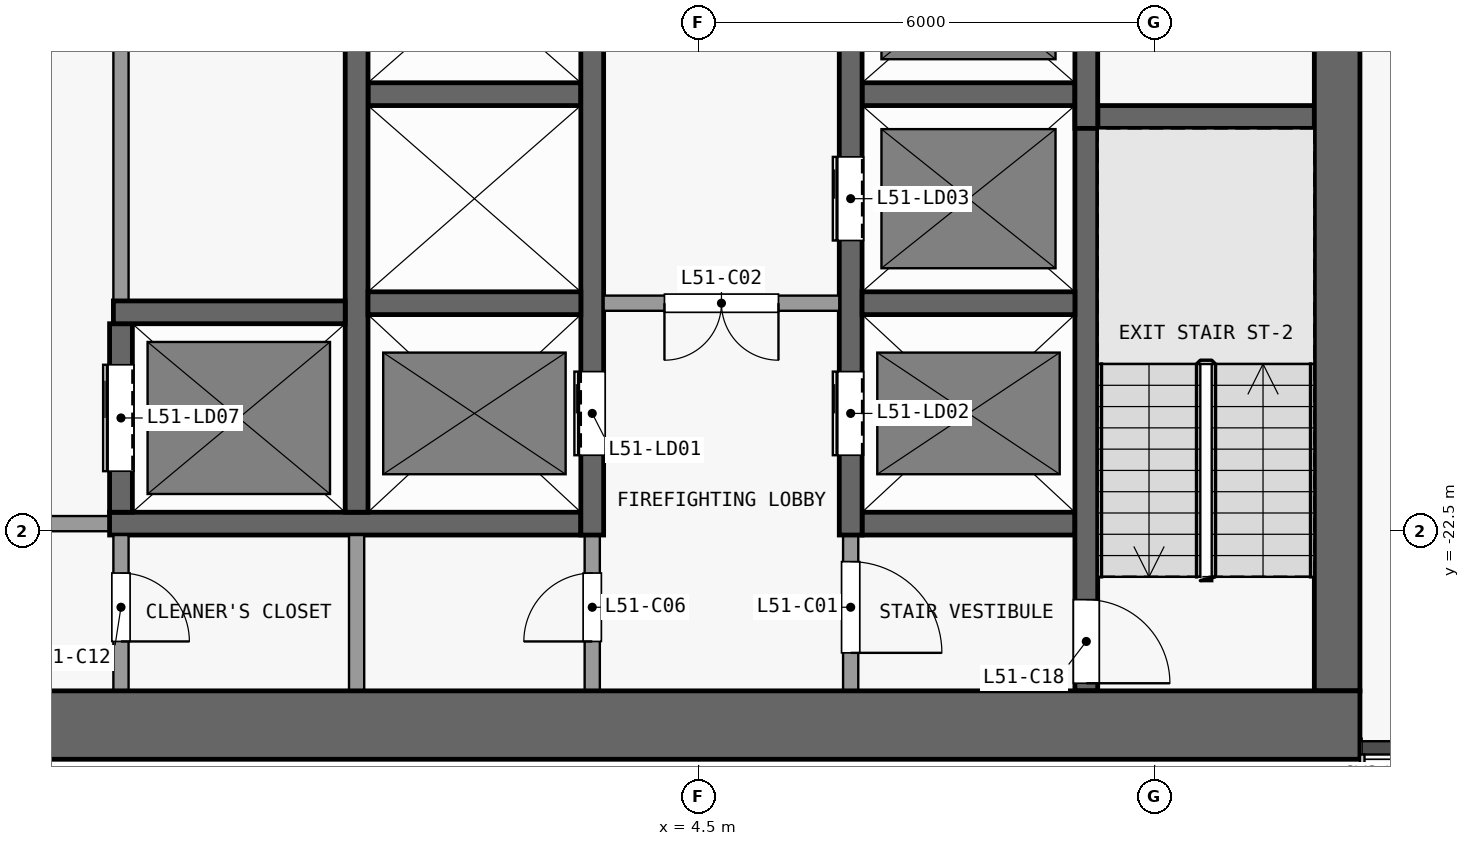
"""IFC4 building model, lengths in metres.
Left out: names, types, materials, properties, quantities, classifications, styles, units other than length and angle.
Written with IfcOpenShell. Run it as: python <this file> out.ifc"""

import sys

from ifc_helpers import new_model, si_unit, direction, frame, frame_2d, origin, place, context, subcontext, project, spatial, rectangle, extrude, element, fill, save


model = new_model("IFC4")
c1 = context("Model", 3, precision=1e-05, world=origin(), true_north=direction((0.0, 1.0)))
c2 = subcontext(c1, "Body", "Model", "MODEL_VIEW")
j1 = project(units=[si_unit("LENGTHUNIT", "METRE"), si_unit("PLANEANGLEUNIT", "RADIAN")], contexts=[c1])
p1 = place(None, origin())
s1 = spatial("IfcSite", under=j1, at=p1, CompositionType="ELEMENT")
p2 = place(p1, origin())
s2 = spatial("IfcBuilding", under=s1, at=p2, CompositionType="ELEMENT")
p3 = place(p2, frame((0.0, 0.0, 205.1)))
s3 = spatial("IfcBuildingStorey", under=s2, at=p3, CompositionType="ELEMENT", Elevation=205.1)
p4 = place(p3, frame((-13.2, -25.05, 0.0), z_axis=(0.0, 0.0, 1.0), x_axis=(1.0, 0.0, 0.0)))
e1 = element("IfcWall", 1, at=p4, inside=s3, PredefinedType="SHEAR", context=c2, shape_type="SweptSolid", body=[
    extrude(rectangle(XDim=26.4, YDim=0.9, at=frame_2d((13.2, 0.0))), origin(), (0.0, 0.0, 1.0), 3.3),
])
p5 = place(p3, frame((12.9, -24.6, 0.0), z_axis=(0.0, 0.0, 1.0), x_axis=(0.0, 1.0, 0.0)))
e2 = element("IfcWall", 2, at=p5, inside=s3, PredefinedType="SHEAR", context=c2, shape_type="SweptSolid", body=[
    extrude(rectangle(XDim=16.1, YDim=0.6, at=frame_2d((8.05, 0.0))), origin(), (0.0, 0.0, 1.0), 3.3),
])
p6 = place(p3, frame((-3.25, -22.4, 0.0), z_axis=(0.0, 0.0, 1.0), x_axis=(-1.0, 0.0, 0.0)))
e3 = element("IfcWall", 3, at=p6, inside=s3, PredefinedType="PARTITIONING", context=c2, shape_type="SweptSolid", body=[
    extrude(rectangle(XDim=6.2, YDim=0.2, at=frame_2d((3.1, 0.0))), origin(), (0.0, 0.0, 1.0), 3.3),
])
p7 = place(p6, frame((0.8, 0.0, 0.0)))
e4 = element("IfcOpeningElement", 4, at=p7, cuts=e3, PredefinedType="OPENING", context=c2, shape_type="SweptSolid", body=[
    extrude(rectangle(XDim=1.5, YDim=2.1, at=frame_2d((0.75, 1.05))), frame((0.0, 0.11, 0.0), z_axis=(0.0, -1.0, 0.0), x_axis=(1.0, 0.0, 0.0)), (0.0, 0.0, 1.0), 0.22),
])
p8 = place(p3, frame((-3.25, -22.4, 0.0), z_axis=(0.0, 0.0, 1.0), x_axis=(1.0, 0.0, 0.0)))
e5 = element("IfcWall", 5, at=p8, inside=s3, PredefinedType="SHEAR", context=c2, shape_type="SweptSolid", body=[
    extrude(rectangle(XDim=6.2, YDim=0.3, at=frame_2d((3.1, 0.0))), origin(), (0.0, 0.0, 1.0), 3.3),
])
p9 = place(p3, frame((6.65, -22.4, 0.0), z_axis=(0.0, 0.0, 1.0), x_axis=(1.0, 0.0, 0.0)))
e6 = element("IfcWall", 6, at=p9, inside=s3, PredefinedType="SHEAR", context=c2, shape_type="SweptSolid", body=[
    extrude(rectangle(XDim=2.8, YDim=0.3, at=frame_2d((1.4, 0.0))), origin(), (0.0, 0.0, 1.0), 3.3),
])
p10 = place(p3, frame((-3.2, -19.62, 0.0), z_axis=(0.0, 0.0, 1.0), x_axis=(1.0, 0.0, 0.0)))
e7 = element("IfcWall", 7, at=p10, inside=s3, PredefinedType="SHEAR", context=c2, shape_type="SweptSolid", body=[
    extrude(rectangle(XDim=3.05, YDim=0.3, at=frame_2d((1.525, 0.0))), origin(), (0.0, 0.0, 1.0), 3.3),
])
p11 = place(p3, frame((0.15, -19.5, 0.0), z_axis=(0.0, 0.0, 1.0), x_axis=(1.0, 0.0, 0.0)))
e8 = element("IfcWall", 8, at=p11, inside=s3, PredefinedType="SHEAR", context=c2, shape_type="SweptSolid", body=[
    extrude(rectangle(XDim=2.8, YDim=0.3, at=frame_2d((1.4, 0.0))), origin(), (0.0, 0.0, 1.0), 3.3),
])
p12 = place(p3, frame((6.35, -19.5, 0.0), z_axis=(0.0, 0.0, 1.0), x_axis=(-1.0, 0.0, 0.0)))
e9 = element("IfcWall", 9, at=p12, inside=s3, PredefinedType="PARTITIONING", context=c2, shape_type="SweptSolid", body=[
    extrude(rectangle(XDim=3.1, YDim=0.2, at=frame_2d((1.55, 0.0))), origin(), (0.0, 0.0, 1.0), 3.3),
])
p13 = place(p12, frame((0.8, 0.0, 0.0)))
e10 = element("IfcOpeningElement", 10, at=p13, cuts=e9, PredefinedType="OPENING", context=c2, shape_type="SweptSolid", body=[
    extrude(rectangle(XDim=1.5, YDim=2.1, at=frame_2d((0.75, 1.05))), frame((0.0, 0.11, 0.0), z_axis=(0.0, -1.0, 0.0), x_axis=(1.0, 0.0, 0.0)), (0.0, 0.0, 1.0), 0.22),
])
p14 = place(p3, frame((6.65, -19.5, 0.0), z_axis=(0.0, 0.0, 1.0), x_axis=(1.0, 0.0, 0.0)))
e11 = element("IfcWall", 11, at=p14, inside=s3, PredefinedType="SHEAR", context=c2, shape_type="SweptSolid", body=[
    extrude(rectangle(XDim=2.8, YDim=0.3, at=frame_2d((1.4, 0.0))), origin(), (0.0, 0.0, 1.0), 3.3),
])
p15 = place(p3, frame((9.75, -17.05, 0.0), z_axis=(0.0, 0.0, 1.0), x_axis=(1.0, 0.0, 0.0)))
e12 = element("IfcWall", 12, at=p15, inside=s3, PredefinedType="SHEAR", context=c2, shape_type="SweptSolid", body=[
    extrude(rectangle(XDim=2.85, YDim=0.3, at=frame_2d((1.425, 0.0))), origin(), (0.0, 0.0, 1.0), 3.3),
])
for number, where, z_axis, x_axis in (
    (13, (0.15, -16.75, 0.0), (0.0, 0.0, 1.0), (1.0, 0.0, 0.0)),
    (14, (6.65, -16.75, 0.0), (0.0, 0.0, 1.0), (1.0, 0.0, 0.0)),
):
    element("IfcWall", number, at=place(p3, frame(where, z_axis=z_axis, x_axis=x_axis)), inside=s3, PredefinedType="SHEAR", context=c2, shape_type="SweptSolid", body=[
        extrude(rectangle(XDim=2.8, YDim=0.3, at=frame_2d((1.4, 0.0))), origin(), (0.0, 0.0, 1.0), 3.3),
    ])
p16 = place(p3, frame((-3.1, -22.55, 0.0), z_axis=(0.0, 0.0, 1.0), x_axis=(0.0, -1.0, 0.0)))
e15 = element("IfcWall", 15, at=p16, inside=s3, PredefinedType="PARTITIONING", context=c2, shape_type="SweptSolid", body=[
    extrude(rectangle(XDim=2.05, YDim=0.2, at=frame_2d((1.025, 0.0))), origin(), (0.0, 0.0, 1.0), 3.3),
])
p17 = place(p16, frame((0.5, 0.0, 0.0)))
e16 = element("IfcOpeningElement", 16, at=p17, cuts=e15, PredefinedType="OPENING", context=c2, shape_type="SweptSolid", body=[
    extrude(rectangle(XDim=0.9, YDim=2.1, at=frame_2d((0.45, 1.05))), frame((0.0, 0.11, 0.0), z_axis=(0.0, -1.0, 0.0), x_axis=(1.0, 0.0, 0.0)), (0.0, 0.0, 1.0), 0.22),
])
p18 = place(p3, frame((-3.1, -22.25, 0.0), z_axis=(0.0, 0.0, 1.0), x_axis=(0.0, 1.0, 0.0)))
e17 = element("IfcWall", 17, at=p18, inside=s3, PredefinedType="SHEAR", context=c2, shape_type="SweptSolid", body=[
    extrude(rectangle(XDim=2.48, YDim=0.3, at=frame_2d((1.24, 0.0))), origin(), (0.0, 0.0, 1.0), 3.3),
])
p19 = place(p18, frame((0.54, 0.0, 0.0)))
e18 = element("IfcOpeningElement", 18, at=p19, cuts=e17, PredefinedType="OPENING", context=c2, shape_type="SweptSolid", body=[
    extrude(rectangle(XDim=1.4, YDim=2.1, at=frame_2d((0.7, 1.05))), frame((0.0, 0.16, 0.0), z_axis=(0.0, -1.0, 0.0), x_axis=(1.0, 0.0, 0.0)), (0.0, 0.0, 1.0), 0.32),
])
p20 = place(p3, frame((-3.1, -8.5, 0.0), z_axis=(0.0, 0.0, 1.0), x_axis=(0.0, -1.0, 0.0)))
e19 = element("IfcWall", 19, at=p20, inside=s3, PredefinedType="PARTITIONING", context=c2, shape_type="SweptSolid", body=[
    extrude(rectangle(XDim=10.97, YDim=0.2, at=frame_2d((5.485, 0.0))), origin(), (0.0, 0.0, 1.0), 3.3),
])
p21 = place(p20, frame((6.35, 0.0, 0.0)))
e20 = element("IfcOpeningElement", 20, at=p21, cuts=e19, PredefinedType="OPENING", context=c2, shape_type="SweptSolid", body=[
    extrude(rectangle(XDim=1.2, YDim=2.1, at=frame_2d((0.6, 1.05))), frame((0.0, 0.11, 0.0), z_axis=(0.0, -1.0, 0.0), x_axis=(1.0, 0.0, 0.0)), (0.0, 0.0, 1.0), 0.22),
])
p22 = place(p20, frame((0.94, 0.0, 0.0)))
e21 = element("IfcOpeningElement", 21, at=p22, cuts=e19, PredefinedType="OPENING", context=c2, shape_type="SweptSolid", body=[
    extrude(rectangle(XDim=0.9, YDim=2.1, at=frame_2d((0.45, 1.05))), frame((0.0, 0.11, 0.0), z_axis=(0.0, -1.0, 0.0), x_axis=(1.0, 0.0, 0.0)), (0.0, 0.0, 1.0), 0.22),
])
p23 = place(p3, frame((0.0, -24.6, 0.0), z_axis=(0.0, 0.0, 1.0), x_axis=(0.0, 1.0, 0.0)))
e22 = element("IfcWall", 22, at=p23, inside=s3, PredefinedType="PARTITIONING", context=c2, shape_type="SweptSolid", body=[
    extrude(rectangle(XDim=2.05, YDim=0.2, at=frame_2d((1.025, 0.0))), origin(), (0.0, 0.0, 1.0), 3.3),
])
p24 = place(p3, frame((0.0, -22.25, 0.0), z_axis=(0.0, 0.0, 1.0), x_axis=(0.0, 1.0, 0.0)))
e23 = element("IfcWall", 23, at=p24, inside=s3, PredefinedType="SHEAR", context=c2, shape_type="SweptSolid", body=[
    extrude(rectangle(XDim=13.75, YDim=0.3, at=frame_2d((6.875, 0.0))), origin(), (0.0, 0.0, 1.0), 3.3),
])
p25 = place(p3, frame((3.1, -24.6, 0.0), z_axis=(0.0, 0.0, 1.0), x_axis=(0.0, 1.0, 0.0)))
e24 = element("IfcWall", 24, at=p25, inside=s3, PredefinedType="PARTITIONING", context=c2, shape_type="SweptSolid", body=[
    extrude(rectangle(XDim=2.05, YDim=0.2, at=frame_2d((1.025, 0.0))), origin(), (0.0, 0.0, 1.0), 3.3),
])
p26 = place(p25, frame((0.65, 0.0, 0.0)))
e25 = element("IfcOpeningElement", 25, at=p26, cuts=e24, PredefinedType="OPENING", context=c2, shape_type="SweptSolid", body=[
    extrude(rectangle(XDim=0.9, YDim=2.1, at=frame_2d((0.45, 1.05))), frame((0.0, 0.11, 0.0), z_axis=(0.0, -1.0, 0.0), x_axis=(1.0, 0.0, 0.0)), (0.0, 0.0, 1.0), 0.22),
])
p27 = place(p3, frame((3.1, -22.55, 0.0), z_axis=(0.0, 0.0, 1.0), x_axis=(0.0, 1.0, 0.0)))
e26 = element("IfcWall", 26, at=p27, inside=s3, PredefinedType="SHEAR", context=c2, shape_type="SweptSolid", body=[
    extrude(rectangle(XDim=14.05, YDim=0.3, at=frame_2d((7.025, 0.0))), origin(), (0.0, 0.0, 1.0), 3.3),
])
p28 = place(p27, frame((1.05, 0.0, 0.0)))
e27 = element("IfcOpeningElement", 27, at=p28, cuts=e26, PredefinedType="OPENING", context=c2, shape_type="SweptSolid", body=[
    extrude(rectangle(XDim=1.1, YDim=2.1, at=frame_2d((0.55, 1.05))), frame((0.0, 0.16, 0.0), z_axis=(0.0, -1.0, 0.0), x_axis=(1.0, 0.0, 0.0)), (0.0, 0.0, 1.0), 0.32),
])
p29 = place(p3, frame((6.5, -22.55, 0.0), z_axis=(0.0, 0.0, 1.0), x_axis=(0.0, -1.0, 0.0)))
e28 = element("IfcWall", 28, at=p29, inside=s3, PredefinedType="PARTITIONING", context=c2, shape_type="SweptSolid", body=[
    extrude(rectangle(XDim=2.05, YDim=0.2, at=frame_2d((1.025, 0.0))), origin(), (0.0, 0.0, 1.0), 3.3),
])
p30 = place(p29, frame((0.35, 0.0, 0.0)))
e29 = element("IfcOpeningElement", 29, at=p30, cuts=e28, PredefinedType="OPENING", context=c2, shape_type="SweptSolid", body=[
    extrude(rectangle(XDim=1.2, YDim=2.1, at=frame_2d((0.6, 1.05))), frame((0.0, 0.11, 0.0), z_axis=(0.0, -1.0, 0.0), x_axis=(1.0, 0.0, 0.0)), (0.0, 0.0, 1.0), 0.22),
])
p31 = place(p3, frame((6.5, -22.55, 0.0), z_axis=(0.0, 0.0, 1.0), x_axis=(0.0, 1.0, 0.0)))
e30 = element("IfcWall", 30, at=p31, inside=s3, PredefinedType="SHEAR", context=c2, shape_type="SweptSolid", body=[
    extrude(rectangle(XDim=14.05, YDim=0.3, at=frame_2d((7.025, 0.0))), origin(), (0.0, 0.0, 1.0), 3.3),
])
p32 = place(p31, frame((1.05, 0.0, 0.0)))
e31 = element("IfcOpeningElement", 31, at=p32, cuts=e30, PredefinedType="OPENING", context=c2, shape_type="SweptSolid", body=[
    extrude(rectangle(XDim=1.1, YDim=2.1, at=frame_2d((0.55, 1.05))), frame((0.0, 0.16, 0.0), z_axis=(0.0, -1.0, 0.0), x_axis=(1.0, 0.0, 0.0)), (0.0, 0.0, 1.0), 0.32),
])
p33 = place(p31, frame((3.875, 0.0, 0.0)))
e32 = element("IfcOpeningElement", 32, at=p33, cuts=e30, PredefinedType="OPENING", context=c2, shape_type="SweptSolid", body=[
    extrude(rectangle(XDim=1.1, YDim=2.1, at=frame_2d((0.55, 1.05))), frame((0.0, 0.16, 0.0), z_axis=(0.0, -1.0, 0.0), x_axis=(1.0, 0.0, 0.0)), (0.0, 0.0, 1.0), 0.32),
])
p34 = place(p31, frame((6.625, 0.0, 0.0)))
e33 = element("IfcOpeningElement", 33, at=p34, cuts=e30, PredefinedType="OPENING", context=c2, shape_type="SweptSolid", body=[
    extrude(rectangle(XDim=1.1, YDim=2.1, at=frame_2d((0.55, 1.05))), frame((0.0, 0.16, 0.0), z_axis=(0.0, -1.0, 0.0), x_axis=(1.0, 0.0, 0.0)), (0.0, 0.0, 1.0), 0.32),
])
p35 = place(p31, frame((9.375, 0.0, 0.0)))
e34 = element("IfcOpeningElement", 34, at=p35, cuts=e30, PredefinedType="OPENING", context=c2, shape_type="SweptSolid", body=[
    extrude(rectangle(XDim=1.1, YDim=2.1, at=frame_2d((0.55, 1.05))), frame((0.0, 0.16, 0.0), z_axis=(0.0, -1.0, 0.0), x_axis=(1.0, 0.0, 0.0)), (0.0, 0.0, 1.0), 0.32),
])
p36 = place(p31, frame((12.125, 0.0, 0.0)))
e35 = element("IfcOpeningElement", 35, at=p36, cuts=e30, PredefinedType="OPENING", context=c2, shape_type="SweptSolid", body=[
    extrude(rectangle(XDim=1.1, YDim=2.1, at=frame_2d((0.55, 1.05))), frame((0.0, 0.16, 0.0), z_axis=(0.0, -1.0, 0.0), x_axis=(1.0, 0.0, 0.0)), (0.0, 0.0, 1.0), 0.32),
])
p37 = place(p3, frame((9.6, -16.9, 0.0), z_axis=(0.0, 0.0, 1.0), x_axis=(0.0, -1.0, 0.0)))
e36 = element("IfcWall", 36, at=p37, inside=s3, PredefinedType="SHEAR", context=c2, shape_type="SweptSolid", body=[
    extrude(rectangle(XDim=7.7, YDim=0.3, at=frame_2d((3.85, 0.0))), origin(), (0.0, 0.0, 1.0), 3.3),
])
p38 = place(p37, frame((6.5, 0.0, 0.0)))
e37 = element("IfcOpeningElement", 37, at=p38, cuts=e36, PredefinedType="OPENING", context=c2, shape_type="SweptSolid", body=[
    extrude(rectangle(XDim=1.1, YDim=2.1, at=frame_2d((0.55, 1.05))), frame((0.0, 0.16, 0.0), z_axis=(0.0, -1.0, 0.0), x_axis=(1.0, 0.0, 0.0)), (0.0, 0.0, 1.0), 0.32),
])
p39 = place(p3, frame((9.6, -17.2, 0.0), z_axis=(0.0, 0.0, 1.0), x_axis=(0.0, 1.0, 0.0)))
e38 = element("IfcWall", 38, at=p39, inside=s3, PredefinedType="SHEAR", context=c2, shape_type="SweptSolid", body=[
    extrude(rectangle(XDim=8.7, YDim=0.3, at=frame_2d((4.35, 0.0))), origin(), (0.0, 0.0, 1.0), 3.3),
])
p40 = place(p28, origin())
e39 = element("IfcDoor", 39, at=p40, inside=s3, OperationType="DOUBLE_DOOR_SLIDING", PredefinedType="DOOR", context=c2, shape_type="SweptSolid", body=[
    extrude(rectangle(XDim=1.1, YDim=2.1, at=frame_2d((0.55, 1.05))), frame((0.0, 0.025, 0.0), z_axis=(0.0, -1.0, 0.0), x_axis=(1.0, 0.0, 0.0)), (0.0, 0.0, 1.0), 0.05),
])
fill(e27, e39)
p41 = place(p32, origin())
e40 = element("IfcDoor", 40, at=p41, inside=s3, OperationType="DOUBLE_DOOR_SLIDING", PredefinedType="DOOR", context=c2, shape_type="SweptSolid", body=[
    extrude(rectangle(XDim=1.1, YDim=2.1, at=frame_2d((0.55, 1.05))), frame((0.0, 0.025, 0.0), z_axis=(0.0, -1.0, 0.0), x_axis=(1.0, 0.0, 0.0)), (0.0, 0.0, 1.0), 0.05),
])
fill(e31, e40)
p42 = place(p33, origin())
e41 = element("IfcDoor", 41, at=p42, inside=s3, OperationType="DOUBLE_DOOR_SLIDING", PredefinedType="DOOR", context=c2, shape_type="SweptSolid", body=[
    extrude(rectangle(XDim=1.1, YDim=2.1, at=frame_2d((0.55, 1.05))), frame((0.0, 0.025, 0.0), z_axis=(0.0, -1.0, 0.0), x_axis=(1.0, 0.0, 0.0)), (0.0, 0.0, 1.0), 0.05),
])
fill(e32, e41)
p43 = place(p19, origin())
e42 = element("IfcDoor", 42, at=p43, inside=s3, OperationType="DOUBLE_DOOR_SLIDING", PredefinedType="DOOR", context=c2, shape_type="SweptSolid", body=[
    extrude(rectangle(XDim=1.4, YDim=2.1, at=frame_2d((0.7, 1.05))), frame((0.0, 0.025, 0.0), z_axis=(0.0, -1.0, 0.0), x_axis=(1.0, 0.0, 0.0)), (0.0, 0.0, 1.0), 0.05),
])
fill(e18, e42)
p44 = place(p30, origin())
e43 = element("IfcDoor", 43, at=p44, inside=s3, OperationType="SINGLE_SWING_RIGHT", PredefinedType="DOOR", context=c2, shape_type="SweptSolid", body=[
    extrude(rectangle(XDim=1.2, YDim=2.1, at=frame_2d((0.6, 1.05))), frame((0.0, 0.025, 0.0), z_axis=(0.0, -1.0, 0.0), x_axis=(1.0, 0.0, 0.0)), (0.0, 0.0, 1.0), 0.05),
])
fill(e29, e43)
p45 = place(p13, origin())
e44 = element("IfcDoor", 44, at=p45, inside=s3, OperationType="DOUBLE_DOOR_SINGLE_SWING", PredefinedType="DOOR", context=c2, shape_type="SweptSolid", body=[
    extrude(rectangle(XDim=1.5, YDim=2.1, at=frame_2d((0.75, 1.05))), frame((0.0, 0.025, 0.0), z_axis=(0.0, -1.0, 0.0), x_axis=(1.0, 0.0, 0.0)), (0.0, 0.0, 1.0), 0.05),
])
fill(e10, e44)
p46 = place(p26, origin())
e45 = element("IfcDoor", 45, at=p46, inside=s3, OperationType="SINGLE_SWING_LEFT", PredefinedType="DOOR", context=c2, shape_type="SweptSolid", body=[
    extrude(rectangle(XDim=0.9, YDim=2.1, at=frame_2d((0.45, 1.05))), frame((0.0, 0.025, 0.0), z_axis=(0.0, -1.0, 0.0), x_axis=(1.0, 0.0, 0.0)), (0.0, 0.0, 1.0), 0.05),
])
fill(e25, e45)
p47 = place(p17, origin())
e46 = element("IfcDoor", 46, at=p47, inside=s3, OperationType="SINGLE_SWING_RIGHT", PredefinedType="DOOR", context=c2, shape_type="SweptSolid", body=[
    extrude(rectangle(XDim=0.9, YDim=2.1, at=frame_2d((0.45, 1.05))), frame((0.0, 0.025, 0.0), z_axis=(0.0, -1.0, 0.0), x_axis=(1.0, 0.0, 0.0)), (0.0, 0.0, 1.0), 0.05),
])
fill(e16, e46)
p48 = place(p38, origin())
e47 = element("IfcDoor", 47, at=p48, inside=s3, OperationType="SINGLE_SWING_RIGHT", PredefinedType="DOOR", context=c2, shape_type="SweptSolid", body=[
    extrude(rectangle(XDim=1.1, YDim=2.1, at=frame_2d((0.55, 1.05))), frame((0.0, 0.025, 0.0), z_axis=(0.0, -1.0, 0.0), x_axis=(1.0, 0.0, 0.0)), (0.0, 0.0, 1.0), 0.05),
])
fill(e37, e47)
save(model, sys.argv[1])
